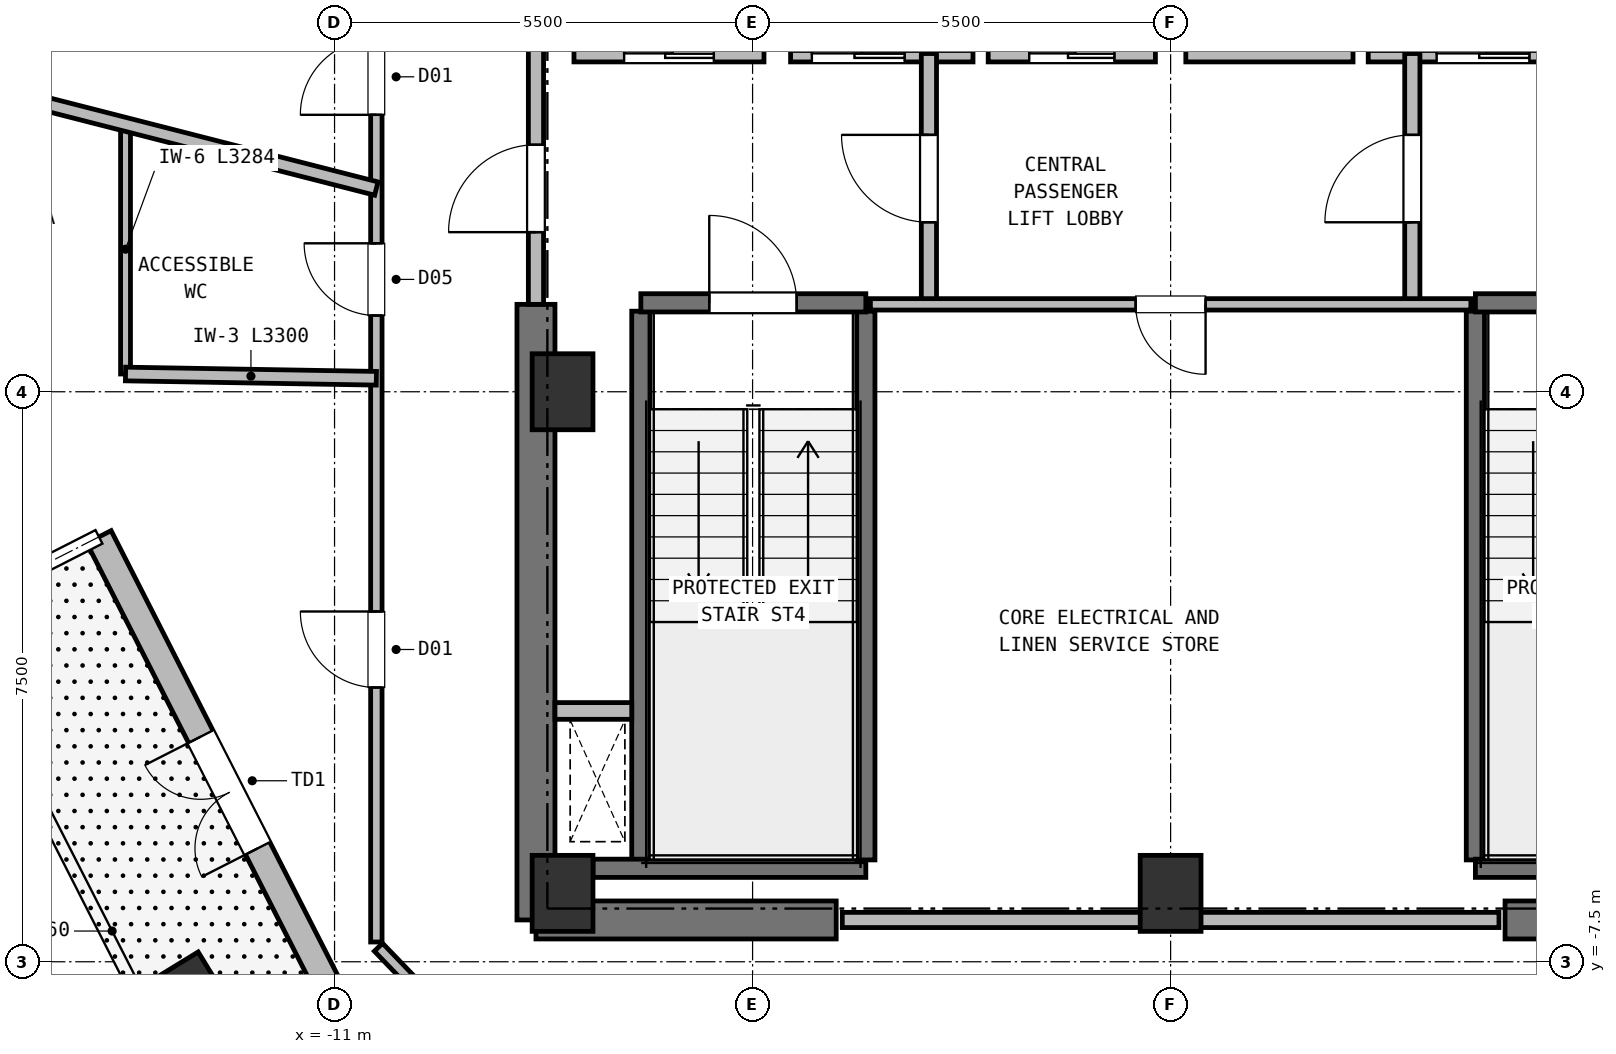
"""IFC4 building model, lengths in metres.
Left out: names, types, materials, properties, quantities, classifications, styles, units other than length and angle.
Written with IfcOpenShell. Run it as: python <this file> out.ifc"""

import sys

from ifc_helpers import new_model, si_unit, direction, frame, frame_2d, origin, origin_2d, place, context, subcontext, project, spatial, rectangle, extrude, element, fill, save


model = new_model("IFC4")
c1 = context("Model", 3, precision=1e-05, world=origin(), true_north=direction((0.0, 1.0)))
c2 = subcontext(c1, "Body", "Model", "MODEL_VIEW")
j1 = project(units=[si_unit("LENGTHUNIT", "METRE"), si_unit("PLANEANGLEUNIT", "RADIAN")], contexts=[c1])
p1 = place(None, origin())
s1 = spatial("IfcSite", under=j1, at=p1, CompositionType="ELEMENT")
p2 = place(p1, origin())
s2 = spatial("IfcBuilding", under=s1, at=p2, CompositionType="ELEMENT")
p3 = place(p2, frame((0.0, 0.0, 194.15)))
s3 = spatial("IfcBuildingStorey", under=s2, at=p3, CompositionType="ELEMENT", Elevation=194.15)
for number, where, z_axis, x_axis in (
    (1, (-8.0, -6.6, 0.0), (0.0, 0.0, 1.0), (1.0, 0.0, 0.0)),
    (2, (0.0, -6.6, 0.0), (0.0, 0.0, 1.0), (1.0, 0.0, 0.0)),
    (3, (-8.0, 0.0, 0.0), (0.0, 0.0, 1.0), (1.0, 0.0, 0.0)),
):
    element("IfcColumn", number, at=place(p3, frame(where, z_axis=z_axis, x_axis=x_axis)), inside=s3, PredefinedType="COLUMN", context=c2, shape_type="SweptSolid", body=[
        extrude(rectangle(XDim=0.8, YDim=1.0, at=origin_2d()), origin(), (0.0, 0.0, 1.0), 3.8),
    ])
for number, where, z_axis, x_axis in (
    (4, (-8.35, -6.95, 0.0), (0.0, 0.0, 1.0), (1.0, 0.0, 0.0)),
    (5, (4.4, -6.95, 0.0), (0.0, 0.0, 1.0), (1.0, 0.0, 0.0)),
):
    element("IfcWall", number, at=place(p3, frame(where, z_axis=z_axis, x_axis=x_axis)), inside=s3, PredefinedType="SHEAR", context=c2, shape_type="SweptSolid", body=[
        extrude(rectangle(XDim=3.95, YDim=0.5, at=frame_2d((1.975, 0.0))), origin(), (0.0, 0.0, 1.0), 3.55),
    ])
p4 = place(p3, frame((-8.35, -6.95, 0.0), z_axis=(0.0, 0.0, 1.0), x_axis=(0.0, 1.0, 0.0)))
e6 = element("IfcWall", 6, at=p4, inside=s3, PredefinedType="SHEAR", context=c2, shape_type="SweptSolid", body=[
    extrude(rectangle(XDim=8.1, YDim=0.5, at=frame_2d((4.05, 0.0))), origin(), (0.0, 0.0, 1.0), 3.55),
])
p5 = place(p3, frame((-13.012, -7.974, 0.0), z_axis=(0.0, 0.0, 1.0), x_axis=(-0.522498564716, 0.852640164354, 0.0)))
e7 = element("IfcColumn", 7, at=p5, inside=s3, PredefinedType="COLUMN", context=c2, shape_type="SweptSolid", body=[
    extrude(rectangle(XDim=0.8, YDim=1.0, at=origin_2d()), origin(), (0.0, 0.0, 1.0), 3.8),
])
p6 = place(p3, frame((-9.833, -10.285, 0.0), z_axis=(0.0, 0.0, 1.0), x_axis=(-0.453963909428, 0.891020072129, 0.0)))
e8 = element("IfcWall", 8, at=p6, inside=s3, PredefinedType="SOLIDWALL", context=c2, shape_type="SweptSolid", body=[
    extrude(rectangle(XDim=9.4, YDim=0.36, at=frame_2d((4.7, 0.0))), origin(), (0.0, 0.0, 1.0), 3.23),
])
p7 = place(p6, frame((4.8, 0.0, 0.0)))
e9 = element("IfcOpeningElement", 9, at=p7, cuts=e8, PredefinedType="OPENING", context=c2, shape_type="SweptSolid", body=[
    extrude(rectangle(XDim=1.65, YDim=2.25, at=frame_2d((0.825, 1.125))), frame((0.0, 0.19, 0.0), z_axis=(0.0, -1.0, 0.0), x_axis=(1.0, 0.0, 0.0)), (0.0, 0.0, 1.0), 0.38),
])
p8 = place(p3, frame((-6.97, -6.16, 0.0), z_axis=(0.0, 0.0, 1.0), x_axis=(0.0, 1.0, 0.0)))
e10 = element("IfcWall", 10, at=p8, inside=s3, PredefinedType="SHEAR", context=c2, shape_type="SweptSolid", body=[
    extrude(rectangle(XDim=7.22, YDim=0.24, at=frame_2d((3.61, 0.0))), origin(), (0.0, 0.0, 1.0), 3.55),
])
p9 = place(p3, frame((-7.6, -6.27, 0.0), z_axis=(0.0, 0.0, 1.0), x_axis=(1.0, 0.0, 0.0)))
e11 = element("IfcWall", 11, at=p9, inside=s3, PredefinedType="SHEAR", context=c2, shape_type="SweptSolid", body=[
    extrude(rectangle(XDim=3.59, YDim=0.24, at=frame_2d((1.795, 0.0))), origin(), (0.0, 0.0, 1.0), 3.55),
])
p10 = place(p3, frame((-4.01, -6.16, 0.0), z_axis=(0.0, 0.0, 1.0), x_axis=(0.0, 1.0, 0.0)))
e12 = element("IfcWall", 12, at=p10, inside=s3, PredefinedType="SHEAR", context=c2, shape_type="SweptSolid", body=[
    extrude(rectangle(XDim=7.22, YDim=0.24, at=frame_2d((3.61, 0.0))), origin(), (0.0, 0.0, 1.0), 3.55),
])
p11 = place(p3, frame((-6.97, 1.17, 0.0), z_axis=(0.0, 0.0, 1.0), x_axis=(1.0, 0.0, 0.0)))
e13 = element("IfcWall", 13, at=p11, inside=s3, PredefinedType="SHEAR", context=c2, shape_type="SweptSolid", body=[
    extrude(rectangle(XDim=2.96, YDim=0.24, at=frame_2d((1.48, 0.0))), origin(), (0.0, 0.0, 1.0), 3.55),
])
p12 = place(p11, frame((0.9, 0.0, 0.0)))
e14 = element("IfcOpeningElement", 14, at=p12, cuts=e13, PredefinedType="OPENING", context=c2, shape_type="SweptSolid", body=[
    extrude(rectangle(XDim=1.15, YDim=2.15, at=frame_2d((0.575, 1.075))), frame((0.0, 0.13, 0.0), z_axis=(0.0, -1.0, 0.0), x_axis=(1.0, 0.0, 0.0)), (0.0, 0.0, 1.0), 0.26),
])
p13 = place(p3, frame((4.01, -6.16, 0.0), z_axis=(0.0, 0.0, 1.0), x_axis=(0.0, 1.0, 0.0)))
e15 = element("IfcWall", 15, at=p13, inside=s3, PredefinedType="SHEAR", context=c2, shape_type="SweptSolid", body=[
    extrude(rectangle(XDim=7.22, YDim=0.24, at=frame_2d((3.61, 0.0))), origin(), (0.0, 0.0, 1.0), 3.55),
])
p14 = place(p3, frame((4.01, -6.27, 0.0), z_axis=(0.0, 0.0, 1.0), x_axis=(1.0, 0.0, 0.0)))
e16 = element("IfcWall", 16, at=p14, inside=s3, PredefinedType="SHEAR", context=c2, shape_type="SweptSolid", body=[
    extrude(rectangle(XDim=3.59, YDim=0.24, at=frame_2d((1.795, 0.0))), origin(), (0.0, 0.0, 1.0), 3.55),
])
p15 = place(p3, frame((4.01, 1.17, 0.0), z_axis=(0.0, 0.0, 1.0), x_axis=(1.0, 0.0, 0.0)))
e17 = element("IfcWall", 17, at=p15, inside=s3, PredefinedType="SHEAR", context=c2, shape_type="SweptSolid", body=[
    extrude(rectangle(XDim=2.96, YDim=0.24, at=frame_2d((1.48, 0.0))), origin(), (0.0, 0.0, 1.0), 3.55),
])
p16 = place(p15, frame((0.9, 0.0, 0.0)))
e18 = element("IfcOpeningElement", 18, at=p16, cuts=e17, PredefinedType="OPENING", context=c2, shape_type="SweptSolid", body=[
    extrude(rectangle(XDim=1.15, YDim=2.15, at=frame_2d((0.575, 1.075))), frame((0.0, 0.13, 0.0), z_axis=(0.0, -1.0, 0.0), x_axis=(1.0, 0.0, 0.0)), (0.0, 0.0, 1.0), 0.26),
])
p17 = place(p3, frame((-8.1, -4.2, 0.0), z_axis=(0.0, 0.0, 1.0), x_axis=(1.0, 0.0, 0.0)))
e19 = element("IfcWall", 19, at=p17, inside=s3, PredefinedType="PARTITIONING", context=c2, shape_type="SweptSolid", body=[
    extrude(rectangle(XDim=1.01, YDim=0.22, at=frame_2d((0.505, 0.0))), origin(), (0.0, 0.0, 1.0), 3.55),
])
p18 = place(p3, frame((-7.85, 4.45, 0.0), z_axis=(0.0, 0.0, 1.0), x_axis=(1.0, 0.0, 0.0)))
e20 = element("IfcWall", 20, at=p18, inside=s3, PredefinedType="PARTITIONING", context=c2, shape_type="SweptSolid", body=[
    extrude(rectangle(XDim=2.5, YDim=0.22, at=frame_2d((1.25, 0.0))), origin(), (0.0, 0.0, 1.0), 3.55),
])
p19 = place(p18, frame((0.66, 0.0, 0.0)))
e21 = element("IfcOpeningElement", 21, at=p19, cuts=e20, PredefinedType="OPENING", context=c2, shape_type="SweptSolid", body=[
    extrude(rectangle(XDim=1.18, YDim=2.15, at=frame_2d((0.59, 1.075))), frame((0.0, 0.12, 0.0), z_axis=(0.0, -1.0, 0.0), x_axis=(1.0, 0.0, 0.0)), (0.0, 0.0, 1.0), 0.24),
])
p20 = place(p3, frame((-5.0, 4.45, 0.0), z_axis=(0.0, 0.0, 1.0), x_axis=(1.0, 0.0, 0.0)))
e22 = element("IfcWall", 22, at=p20, inside=s3, PredefinedType="PARTITIONING", context=c2, shape_type="SweptSolid", body=[
    extrude(rectangle(XDim=2.4, YDim=0.22, at=frame_2d((1.2, 0.0))), origin(), (0.0, 0.0, 1.0), 3.55),
])
p21 = place(p20, frame((0.28, 0.0, 0.0)))
e23 = element("IfcOpeningElement", 23, at=p21, cuts=e22, PredefinedType="OPENING", context=c2, shape_type="SweptSolid", body=[
    extrude(rectangle(XDim=1.22, YDim=2.15, at=frame_2d((0.61, 1.075))), frame((0.0, 0.12, 0.0), z_axis=(0.0, -1.0, 0.0), x_axis=(1.0, 0.0, 0.0)), (0.0, 0.0, 1.0), 0.24),
])
p22 = place(p3, frame((2.6, 4.45, 0.0), z_axis=(0.0, 0.0, 1.0), x_axis=(1.0, 0.0, 0.0)))
e24 = element("IfcWall", 24, at=p22, inside=s3, PredefinedType="PARTITIONING", context=c2, shape_type="SweptSolid", body=[
    extrude(rectangle(XDim=2.4, YDim=0.22, at=frame_2d((1.2, 0.0))), origin(), (0.0, 0.0, 1.0), 3.55),
])
p23 = place(p22, frame((0.9, 0.0, 0.0)))
e25 = element("IfcOpeningElement", 25, at=p23, cuts=e24, PredefinedType="OPENING", context=c2, shape_type="SweptSolid", body=[
    extrude(rectangle(XDim=1.22, YDim=2.15, at=frame_2d((0.61, 1.075))), frame((0.0, 0.12, 0.0), z_axis=(0.0, -1.0, 0.0), x_axis=(1.0, 0.0, 0.0)), (0.0, 0.0, 1.0), 0.24),
])
p24 = place(p3, frame((-2.4, 4.45, 0.0), z_axis=(0.0, 0.0, 1.0), x_axis=(1.0, 0.0, 0.0)))
e26 = element("IfcWall", 26, at=p24, inside=s3, PredefinedType="PARTITIONING", context=c2, shape_type="SweptSolid", body=[
    extrude(rectangle(XDim=2.2, YDim=0.22, at=frame_2d((1.1, 0.0))), origin(), (0.0, 0.0, 1.0), 3.55),
])
p25 = place(p24, frame((0.54, 0.0, 0.0)))
e27 = element("IfcOpeningElement", 27, at=p25, cuts=e26, PredefinedType="OPENING", context=c2, shape_type="SweptSolid", body=[
    extrude(rectangle(XDim=1.12, YDim=2.15, at=frame_2d((0.56, 1.075))), frame((0.0, 0.12, 0.0), z_axis=(0.0, -1.0, 0.0), x_axis=(1.0, 0.0, 0.0)), (0.0, 0.0, 1.0), 0.24),
])
p26 = place(p3, frame((0.2, 4.45, 0.0), z_axis=(0.0, 0.0, 1.0), x_axis=(1.0, 0.0, 0.0)))
e28 = element("IfcWall", 28, at=p26, inside=s3, PredefinedType="PARTITIONING", context=c2, shape_type="SweptSolid", body=[
    extrude(rectangle(XDim=2.2, YDim=0.22, at=frame_2d((1.1, 0.0))), origin(), (0.0, 0.0, 1.0), 3.55),
])
p27 = place(p3, frame((-3.18, 1.15, 0.0), z_axis=(0.0, 0.0, 1.0), x_axis=(0.0, 1.0, 0.0)))
e29 = element("IfcWall", 29, at=p27, inside=s3, PredefinedType="PARTITIONING", context=c2, shape_type="SweptSolid", body=[
    extrude(rectangle(XDim=3.3, YDim=0.2, at=frame_2d((1.65, 0.0))), origin(), (0.0, 0.0, 1.0), 3.55),
])
p28 = place(p27, frame((1.08, 0.0, 0.0)))
e30 = element("IfcOpeningElement", 30, at=p28, cuts=e29, PredefinedType="OPENING", context=c2, shape_type="SweptSolid", body=[
    extrude(rectangle(XDim=1.15, YDim=2.15, at=frame_2d((0.575, 1.075))), frame((0.0, 0.11, 0.0), z_axis=(0.0, -1.0, 0.0), x_axis=(1.0, 0.0, 0.0)), (0.0, 0.0, 1.0), 0.22),
])
p29 = place(p3, frame((3.18, 1.15, 0.0), z_axis=(0.0, 0.0, 1.0), x_axis=(0.0, 1.0, 0.0)))
e31 = element("IfcWall", 31, at=p29, inside=s3, PredefinedType="PARTITIONING", context=c2, shape_type="SweptSolid", body=[
    extrude(rectangle(XDim=3.3, YDim=0.2, at=frame_2d((1.65, 0.0))), origin(), (0.0, 0.0, 1.0), 3.55),
])
p30 = place(p29, frame((1.08, 0.0, 0.0)))
e32 = element("IfcOpeningElement", 32, at=p30, cuts=e31, PredefinedType="OPENING", context=c2, shape_type="SweptSolid", body=[
    extrude(rectangle(XDim=1.15, YDim=2.15, at=frame_2d((0.575, 1.075))), frame((0.0, 0.11, 0.0), z_axis=(0.0, -1.0, 0.0), x_axis=(1.0, 0.0, 0.0)), (0.0, 0.0, 1.0), 0.22),
])
p31 = place(p3, frame((-8.35, 1.15, 0.0), z_axis=(0.0, 0.0, 1.0), x_axis=(0.0, 1.0, 0.0)))
e33 = element("IfcWall", 33, at=p31, inside=s3, PredefinedType="PARTITIONING", context=c2, shape_type="SweptSolid", body=[
    extrude(rectangle(XDim=5.4, YDim=0.2, at=frame_2d((2.7, 0.0))), origin(), (0.0, 0.0, 1.0), 3.55),
])
p32 = place(p31, frame((0.95, 0.0, 0.0)))
e34 = element("IfcOpeningElement", 34, at=p32, cuts=e33, PredefinedType="OPENING", context=c2, shape_type="SweptSolid", body=[
    extrude(rectangle(XDim=1.15, YDim=2.15, at=frame_2d((0.575, 1.075))), frame((0.0, 0.11, 0.0), z_axis=(0.0, -1.0, 0.0), x_axis=(1.0, 0.0, 0.0)), (0.0, 0.0, 1.0), 0.22),
])
p33 = place(p3, frame((3.95, 1.15, 0.0), z_axis=(0.0, 0.0, 1.0), x_axis=(-1.0, 0.0, 0.0)))
e35 = element("IfcWall", 35, at=p33, inside=s3, PredefinedType="PARTITIONING", context=c2, shape_type="SweptSolid", body=[
    extrude(rectangle(XDim=7.9, YDim=0.15, at=frame_2d((3.95, 0.0))), origin(), (0.0, 0.0, 1.0), 3.55),
])
p34 = place(p33, frame((3.49, 0.0, 0.0)))
e36 = element("IfcOpeningElement", 36, at=p34, cuts=e35, PredefinedType="OPENING", context=c2, shape_type="SweptSolid", body=[
    extrude(rectangle(XDim=0.92, YDim=2.05, at=frame_2d((0.46, 1.025))), frame((0.0, 0.085, 0.0), z_axis=(0.0, -1.0, 0.0), x_axis=(1.0, 0.0, 0.0)), (0.0, 0.0, 1.0), 0.17),
])
p35 = place(p3, frame((-4.32, -6.95, 0.0), z_axis=(0.0, 0.0, 1.0), x_axis=(1.0, 0.0, 0.0)))
e37 = element("IfcWall", 37, at=p35, inside=s3, PredefinedType="PARTITIONING", context=c2, shape_type="SweptSolid", body=[
    extrude(rectangle(XDim=8.64, YDim=0.2, at=frame_2d((4.32, 0.0))), origin(), (0.0, 0.0, 1.0), 3.55),
])
p36 = place(p3, frame((-10.45, -7.24, 0.0), z_axis=(0.0, 0.0, 1.0), x_axis=(0.0, 1.0, 0.0)))
e38 = element("IfcWall", 38, at=p36, inside=s3, PredefinedType="PARTITIONING", context=c2, shape_type="SweptSolid", body=[
    extrude(rectangle(XDim=14.48, YDim=0.15, at=frame_2d((7.24, 0.0))), origin(), (0.0, 0.0, 1.0), 3.23),
])
p37 = place(p36, frame((8.243, 0.0, 0.0)))
e39 = element("IfcOpeningElement", 39, at=p37, cuts=e38, PredefinedType="OPENING", context=c2, shape_type="SweptSolid", body=[
    extrude(rectangle(XDim=0.95, YDim=2.1, at=frame_2d((0.475, 1.05))), frame((0.0, 0.085, 0.0), z_axis=(0.0, -1.0, 0.0), x_axis=(1.0, 0.0, 0.0)), (0.0, 0.0, 1.0), 0.17),
])
p38 = place(p36, frame((10.884, 0.0, 0.0)))
e40 = element("IfcOpeningElement", 40, at=p38, cuts=e38, PredefinedType="OPENING", context=c2, shape_type="SweptSolid", body=[
    extrude(rectangle(XDim=1.0, YDim=2.15, at=frame_2d((0.5, 1.075))), frame((0.0, 0.085, 0.0), z_axis=(0.0, -1.0, 0.0), x_axis=(1.0, 0.0, 0.0)), (0.0, 0.0, 1.0), 0.17),
])
p39 = place(p36, frame((3.349, 0.0, 0.0)))
e41 = element("IfcOpeningElement", 41, at=p39, cuts=e38, PredefinedType="OPENING", context=c2, shape_type="SweptSolid", body=[
    extrude(rectangle(XDim=1.0, YDim=2.15, at=frame_2d((0.5, 1.075))), frame((0.0, 0.085, 0.0), z_axis=(0.0, -1.0, 0.0), x_axis=(1.0, 0.0, 0.0)), (0.0, 0.0, 1.0), 0.17),
])
p40 = place(p3, frame((-8.648, -9.151, 0.0), z_axis=(0.0, 0.0, 1.0), x_axis=(-0.693764562202, 0.720201869085, 0.0)))
e42 = element("IfcWall", 42, at=p40, inside=s3, PredefinedType="PARTITIONING", context=c2, shape_type="SweptSolid", body=[
    extrude(rectangle(XDim=2.558, YDim=0.15, at=frame_2d((1.279, 0.0))), origin(), (0.0, 0.0, 1.0), 3.23),
])
p41 = place(p3, frame((-13.75, 0.233, 0.0), z_axis=(0.0, 0.0, 1.0), x_axis=(0.0, 1.0, 0.0)))
e43 = element("IfcWall", 43, at=p41, inside=s3, PredefinedType="PARTITIONING", context=c2, shape_type="SweptSolid", body=[
    extrude(rectangle(XDim=3.285, YDim=0.13, at=frame_2d((1.642, 0.0))), origin(), (0.0, 0.0, 1.0), 3.55),
])
p42 = place(p3, frame((-10.45, 0.177, 0.0), z_axis=(0.0, 0.0, 1.0), x_axis=(-0.999856521487, 0.0169391983, 0.0)))
e44 = element("IfcWall", 44, at=p42, inside=s3, PredefinedType="PARTITIONING", context=c2, shape_type="SweptSolid", body=[
    extrude(rectangle(XDim=3.301, YDim=0.18, at=frame_2d((1.65, 0.0))), origin(), (0.0, 0.0, 1.0), 3.55),
])
p43 = place(p3, frame((-10.45, 2.674, 0.0), z_axis=(0.0, 0.0, 1.0), x_axis=(-0.968789680245, 0.247884157321, 0.0)))
e45 = element("IfcWall", 45, at=p43, inside=s3, PredefinedType="PARTITIONING", context=c2, shape_type="SweptSolid", body=[
    extrude(rectangle(XDim=8.479, YDim=0.18, at=frame_2d((4.24, 0.0))), origin(), (0.0, 0.0, 1.0), 3.55),
])
p44 = place(p7, origin())
e46 = element("IfcDoor", 46, at=p44, inside=s3, OperationType="DOUBLE_DOOR_SINGLE_SWING", PredefinedType="DOOR", context=c2, shape_type="SweptSolid", body=[
    extrude(rectangle(XDim=1.65, YDim=2.25, at=frame_2d((0.825, 1.125))), frame((0.0, 0.025, 0.0), z_axis=(0.0, -1.0, 0.0), x_axis=(1.0, 0.0, 0.0)), (0.0, 0.0, 1.0), 0.05),
])
fill(e9, e46)
p45 = place(p12, origin())
e47 = element("IfcDoor", 47, at=p45, inside=s3, OperationType="SINGLE_SWING_LEFT", PredefinedType="DOOR", context=c2, shape_type="SweptSolid", body=[
    extrude(rectangle(XDim=1.15, YDim=2.15, at=frame_2d((0.575, 1.075))), frame((0.0, 0.025, 0.0), z_axis=(0.0, -1.0, 0.0), x_axis=(1.0, 0.0, 0.0)), (0.0, 0.0, 1.0), 0.05),
])
fill(e14, e47)
p46 = place(p19, origin())
e48 = element("IfcDoor", 48, at=p46, inside=s3, OperationType="DOUBLE_DOOR_SLIDING", PredefinedType="DOOR", context=c2, shape_type="SweptSolid", body=[
    extrude(rectangle(XDim=1.18, YDim=2.15, at=frame_2d((0.59, 1.075))), frame((0.0, 0.025, 0.0), z_axis=(0.0, -1.0, 0.0), x_axis=(1.0, 0.0, 0.0)), (0.0, 0.0, 1.0), 0.05),
])
fill(e21, e48)
p47 = place(p21, origin())
e49 = element("IfcDoor", 49, at=p47, inside=s3, OperationType="DOUBLE_DOOR_SLIDING", PredefinedType="DOOR", context=c2, shape_type="SweptSolid", body=[
    extrude(rectangle(XDim=1.22, YDim=2.15, at=frame_2d((0.61, 1.075))), frame((0.0, 0.025, 0.0), z_axis=(0.0, -1.0, 0.0), x_axis=(1.0, 0.0, 0.0)), (0.0, 0.0, 1.0), 0.05),
])
fill(e23, e49)
p48 = place(p23, origin())
e50 = element("IfcDoor", 50, at=p48, inside=s3, OperationType="DOUBLE_DOOR_SLIDING", PredefinedType="DOOR", context=c2, shape_type="SweptSolid", body=[
    extrude(rectangle(XDim=1.22, YDim=2.15, at=frame_2d((0.61, 1.075))), frame((0.0, 0.025, 0.0), z_axis=(0.0, -1.0, 0.0), x_axis=(1.0, 0.0, 0.0)), (0.0, 0.0, 1.0), 0.05),
])
fill(e25, e50)
p49 = place(p25, origin())
e51 = element("IfcDoor", 51, at=p49, inside=s3, OperationType="DOUBLE_DOOR_SLIDING", PredefinedType="DOOR", context=c2, shape_type="SweptSolid", body=[
    extrude(rectangle(XDim=1.12, YDim=2.15, at=frame_2d((0.56, 1.075))), frame((0.0, 0.025, 0.0), z_axis=(0.0, -1.0, 0.0), x_axis=(1.0, 0.0, 0.0)), (0.0, 0.0, 1.0), 0.05),
])
fill(e27, e51)
p50 = place(p28, origin())
e52 = element("IfcDoor", 52, at=p50, inside=s3, OperationType="SINGLE_SWING_RIGHT", PredefinedType="DOOR", context=c2, shape_type="SweptSolid", body=[
    extrude(rectangle(XDim=1.15, YDim=2.15, at=frame_2d((0.575, 1.075))), frame((0.0, 0.025, 0.0), z_axis=(0.0, -1.0, 0.0), x_axis=(1.0, 0.0, 0.0)), (0.0, 0.0, 1.0), 0.05),
])
fill(e30, e52)
p51 = place(p30, origin())
e53 = element("IfcDoor", 53, at=p51, inside=s3, OperationType="SINGLE_SWING_LEFT", PredefinedType="DOOR", context=c2, shape_type="SweptSolid", body=[
    extrude(rectangle(XDim=1.15, YDim=2.15, at=frame_2d((0.575, 1.075))), frame((0.0, 0.025, 0.0), z_axis=(0.0, -1.0, 0.0), x_axis=(1.0, 0.0, 0.0)), (0.0, 0.0, 1.0), 0.05),
])
fill(e32, e53)
p52 = place(p32, origin())
e54 = element("IfcDoor", 54, at=p52, inside=s3, OperationType="SINGLE_SWING_LEFT", PredefinedType="DOOR", context=c2, shape_type="SweptSolid", body=[
    extrude(rectangle(XDim=1.15, YDim=2.15, at=frame_2d((0.575, 1.075))), frame((0.0, 0.025, 0.0), z_axis=(0.0, -1.0, 0.0), x_axis=(1.0, 0.0, 0.0)), (0.0, 0.0, 1.0), 0.05),
])
fill(e34, e54)
p53 = place(p34, origin())
e55 = element("IfcDoor", 55, at=p53, inside=s3, OperationType="SINGLE_SWING_LEFT", PredefinedType="DOOR", context=c2, shape_type="SweptSolid", body=[
    extrude(rectangle(XDim=0.92, YDim=2.05, at=frame_2d((0.46, 1.025))), frame((0.0, 0.025, 0.0), z_axis=(0.0, -1.0, 0.0), x_axis=(1.0, 0.0, 0.0)), (0.0, 0.0, 1.0), 0.05),
])
fill(e36, e55)
p54 = place(p37, origin())
e56 = element("IfcDoor", 56, at=p54, inside=s3, OperationType="SINGLE_SWING_RIGHT", PredefinedType="DOOR", context=c2, shape_type="SweptSolid", body=[
    extrude(rectangle(XDim=0.95, YDim=2.1, at=frame_2d((0.475, 1.05))), frame((0.0, 0.025, 0.0), z_axis=(0.0, -1.0, 0.0), x_axis=(1.0, 0.0, 0.0)), (0.0, 0.0, 1.0), 0.05),
])
fill(e39, e56)
p55 = place(p38, origin())
e57 = element("IfcDoor", 57, at=p55, inside=s3, OperationType="SINGLE_SWING_LEFT", PredefinedType="DOOR", context=c2, shape_type="SweptSolid", body=[
    extrude(rectangle(XDim=1.0, YDim=2.15, at=frame_2d((0.5, 1.075))), frame((0.0, 0.025, 0.0), z_axis=(0.0, -1.0, 0.0), x_axis=(1.0, 0.0, 0.0)), (0.0, 0.0, 1.0), 0.05),
])
fill(e40, e57)
p56 = place(p39, origin())
e58 = element("IfcDoor", 58, at=p56, inside=s3, OperationType="SINGLE_SWING_RIGHT", PredefinedType="DOOR", context=c2, shape_type="SweptSolid", body=[
    extrude(rectangle(XDim=1.0, YDim=2.15, at=frame_2d((0.5, 1.075))), frame((0.0, 0.025, 0.0), z_axis=(0.0, -1.0, 0.0), x_axis=(1.0, 0.0, 0.0)), (0.0, 0.0, 1.0), 0.05),
])
fill(e41, e58)
save(model, sys.argv[1])
